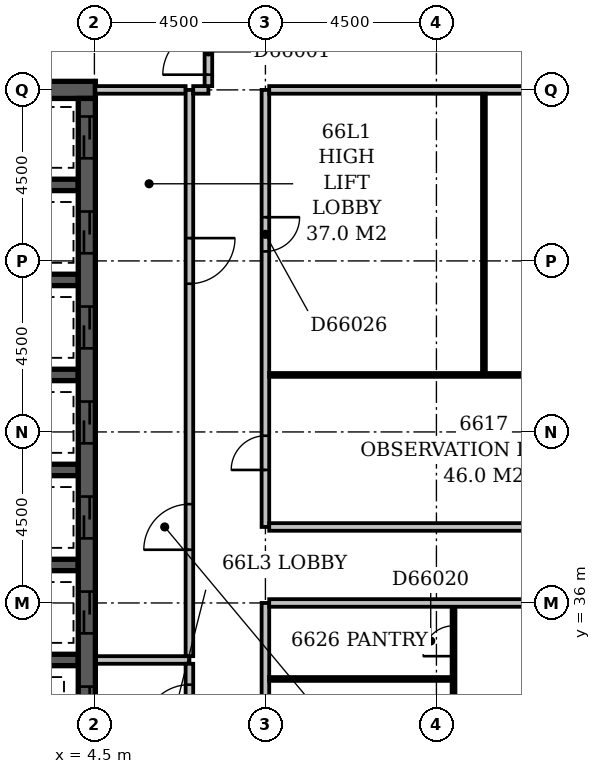
"""IFC4 building model, lengths in metres.
Left out: names, types, materials, properties, quantities, classifications, styles, units other than length and angle.
Written with IfcOpenShell. Run it as: python <this file> out.ifc"""

import sys

from ifc_helpers import new_model, si_unit, direction, frame, frame_2d, origin, place, context, subcontext, project, spatial, rectangle, extrude, element, fill, save


model = new_model("IFC4")
c1 = context("Model", 3, precision=1e-05, world=origin(), true_north=direction((0.0, 1.0)))
c2 = subcontext(c1, "Body", "Model", "MODEL_VIEW")
j1 = project(units=[si_unit("LENGTHUNIT", "METRE"), si_unit("PLANEANGLEUNIT", "RADIAN")], contexts=[c1])
p1 = place(None, origin())
s1 = spatial("IfcSite", under=j1, at=p1, CompositionType="ELEMENT")
p2 = place(p1, origin())
s2 = spatial("IfcBuilding", under=s1, at=p2, CompositionType="ELEMENT")
p3 = place(p2, frame((0.0, 0.0, 254.6)))
s3 = spatial("IfcBuildingStorey", under=s2, at=p3, CompositionType="ELEMENT", Elevation=254.6)
p4 = place(p3, frame((0.275, 49.5, -0.3), z_axis=(0.0, 0.0, 1.0), x_axis=(1.0, 0.0, 0.0)))
e1 = element("IfcWall", 1, at=p4, inside=s3, PredefinedType="SHEAR", context=c2, shape_type="SweptSolid", body=[
    extrude(rectangle(XDim=4.25, YDim=0.45, at=frame_2d((2.125, 0.0))), origin(), (0.0, 0.0, 1.0), 3.45),
])
for number, where, z_axis, x_axis in (
    (2, (0.725, 34.5, -0.3), (0.0, 0.0, 1.0), (1.0, 0.0, 0.0)),
    (3, (0.725, 37.0, -0.3), (0.0, 0.0, 1.0), (1.0, 0.0, 0.0)),
    (4, (0.725, 39.5, -0.3), (0.0, 0.0, 1.0), (1.0, 0.0, 0.0)),
    (5, (0.725, 42.0, -0.3), (0.0, 0.0, 1.0), (1.0, 0.0, 0.0)),
    (6, (0.725, 44.5, -0.3), (0.0, 0.0, 1.0), (1.0, 0.0, 0.0)),
    (7, (0.725, 47.0, -0.3), (0.0, 0.0, 1.0), (1.0, 0.0, 0.0)),
):
    element("IfcWall", number, at=place(p3, frame(where, z_axis=z_axis, x_axis=x_axis)), inside=s3, PredefinedType="SHEAR", context=c2, shape_type="SweptSolid", body=[
        extrude(rectangle(XDim=3.35, YDim=0.3, at=frame_2d((1.675, 0.0))), origin(), (0.0, 0.0, 1.0), 3.45),
    ])
p5 = place(p3, frame((4.3, 27.15, -0.3), z_axis=(0.0, 0.0, 1.0), x_axis=(0.0, 1.0, 0.0)))
e8 = element("IfcWall", 8, at=p5, inside=s3, PredefinedType="SHEAR", context=c2, shape_type="SweptSolid", body=[
    extrude(rectangle(XDim=22.125, YDim=0.45, at=frame_2d((11.062, 0.0))), origin(), (0.0, 0.0, 1.0), 3.45),
])
p6 = place(p5, frame((3.05, 0.0, 0.3)))
e9 = element("IfcOpeningElement", 9, at=p6, cuts=e8, PredefinedType="OPENING", context=c2, shape_type="SweptSolid", body=[
    extrude(rectangle(XDim=1.1, YDim=2.1, at=frame_2d((0.55, 1.05))), frame((0.0, 0.237, 0.0), z_axis=(0.0, -1.0, 0.0), x_axis=(1.0, 0.0, 0.0)), (0.0, 0.0, 1.0), 0.474),
])
p7 = place(p5, frame((0.55, 0.0, 0.3)))
e10 = element("IfcOpeningElement", 10, at=p7, cuts=e8, PredefinedType="OPENING", context=c2, shape_type="SweptSolid", body=[
    extrude(rectangle(XDim=1.1, YDim=2.1, at=frame_2d((0.55, 1.05))), frame((0.0, 0.237, 0.0), z_axis=(0.0, -1.0, 0.0), x_axis=(1.0, 0.0, 0.0)), (0.0, 0.0, 1.0), 0.474),
])
p8 = place(p5, frame((20.55, 0.0, 0.3)))
e11 = element("IfcOpeningElement", 11, at=p8, cuts=e8, PredefinedType="OPENING", context=c2, shape_type="SweptSolid", body=[
    extrude(rectangle(XDim=1.1, YDim=2.1, at=frame_2d((0.55, 1.05))), frame((0.0, 0.237, 0.0), z_axis=(0.0, -1.0, 0.0), x_axis=(1.0, 0.0, 0.0)), (0.0, 0.0, 1.0), 0.474),
])
p9 = place(p5, frame((18.05, 0.0, 0.3)))
e12 = element("IfcOpeningElement", 12, at=p9, cuts=e8, PredefinedType="OPENING", context=c2, shape_type="SweptSolid", body=[
    extrude(rectangle(XDim=1.1, YDim=2.1, at=frame_2d((0.55, 1.05))), frame((0.0, 0.237, 0.0), z_axis=(0.0, -1.0, 0.0), x_axis=(1.0, 0.0, 0.0)), (0.0, 0.0, 1.0), 0.474),
])
p10 = place(p5, frame((15.55, 0.0, 0.3)))
e13 = element("IfcOpeningElement", 13, at=p10, cuts=e8, PredefinedType="OPENING", context=c2, shape_type="SweptSolid", body=[
    extrude(rectangle(XDim=1.1, YDim=2.1, at=frame_2d((0.55, 1.05))), frame((0.0, 0.237, 0.0), z_axis=(0.0, -1.0, 0.0), x_axis=(1.0, 0.0, 0.0)), (0.0, 0.0, 1.0), 0.474),
])
p11 = place(p5, frame((13.05, 0.0, 0.3)))
e14 = element("IfcOpeningElement", 14, at=p11, cuts=e8, PredefinedType="OPENING", context=c2, shape_type="SweptSolid", body=[
    extrude(rectangle(XDim=1.1, YDim=2.1, at=frame_2d((0.55, 1.05))), frame((0.0, 0.237, 0.0), z_axis=(0.0, -1.0, 0.0), x_axis=(1.0, 0.0, 0.0)), (0.0, 0.0, 1.0), 0.474),
])
p12 = place(p5, frame((10.55, 0.0, 0.3)))
e15 = element("IfcOpeningElement", 15, at=p12, cuts=e8, PredefinedType="OPENING", context=c2, shape_type="SweptSolid", body=[
    extrude(rectangle(XDim=1.1, YDim=2.1, at=frame_2d((0.55, 1.05))), frame((0.0, 0.237, 0.0), z_axis=(0.0, -1.0, 0.0), x_axis=(1.0, 0.0, 0.0)), (0.0, 0.0, 1.0), 0.474),
])
p13 = place(p5, frame((8.05, 0.0, 0.3)))
e16 = element("IfcOpeningElement", 16, at=p13, cuts=e8, PredefinedType="OPENING", context=c2, shape_type="SweptSolid", body=[
    extrude(rectangle(XDim=1.1, YDim=2.1, at=frame_2d((0.55, 1.05))), frame((0.0, 0.237, 0.0), z_axis=(0.0, -1.0, 0.0), x_axis=(1.0, 0.0, 0.0)), (0.0, 0.0, 1.0), 0.474),
])
p14 = place(p5, frame((5.55, 0.0, 0.3)))
e17 = element("IfcOpeningElement", 17, at=p14, cuts=e8, PredefinedType="OPENING", context=c2, shape_type="SweptSolid", body=[
    extrude(rectangle(XDim=1.1, YDim=2.1, at=frame_2d((0.55, 1.05))), frame((0.0, 0.237, 0.0), z_axis=(0.0, -1.0, 0.0), x_axis=(1.0, 0.0, 0.0)), (0.0, 0.0, 1.0), 0.474),
])
p15 = place(p3, frame((4.545, 34.5, 0.0), z_axis=(0.0, 0.0, 1.0), x_axis=(1.0, 0.0, 0.0)))
e18 = element("IfcWall", 18, at=p15, inside=s3, PredefinedType="PARTITIONING", context=c2, shape_type="SweptSolid", body=[
    extrude(rectangle(XDim=2.455, YDim=0.2, at=frame_2d((1.228, 0.0))), origin(), (0.0, 0.0, 1.0), 3.15),
])
p16 = place(p3, frame((7.0, 34.6, 0.0), z_axis=(0.0, 0.0, 1.0), x_axis=(0.0, 1.0, 0.0)))
e19 = element("IfcWall", 19, at=p16, inside=s3, PredefinedType="PARTITIONING", context=c2, shape_type="SweptSolid", body=[
    extrude(rectangle(XDim=14.9, YDim=0.2, at=frame_2d((7.45, 0.0))), origin(), (0.0, 0.0, 1.0), 3.15),
])
p17 = place(p16, frame((2.8, 0.0, 0.0)))
e20 = element("IfcOpeningElement", 20, at=p17, cuts=e19, PredefinedType="OPENING", context=c2, shape_type="SweptSolid", body=[
    extrude(rectangle(XDim=1.2, YDim=2.1, at=frame_2d((0.6, 1.05))), frame((0.0, 0.112, 0.0), z_axis=(0.0, -1.0, 0.0), x_axis=(1.0, 0.0, 0.0)), (0.0, 0.0, 1.0), 0.224),
])
p18 = place(p16, frame((9.8, 0.0, 0.0)))
e21 = element("IfcOpeningElement", 21, at=p18, cuts=e19, PredefinedType="OPENING", context=c2, shape_type="SweptSolid", body=[
    extrude(rectangle(XDim=1.2, YDim=2.1, at=frame_2d((0.6, 1.05))), frame((0.0, 0.112, 0.0), z_axis=(0.0, -1.0, 0.0), x_axis=(1.0, 0.0, 0.0)), (0.0, 0.0, 1.0), 0.224),
])
p19 = place(p3, frame((4.525, 49.5, 0.0), z_axis=(0.0, 0.0, 1.0), x_axis=(1.0, 0.0, 0.0)))
e22 = element("IfcWall", 22, at=p19, inside=s3, PredefinedType="PARTITIONING", context=c2, shape_type="SweptSolid", body=[
    extrude(rectangle(XDim=2.375, YDim=0.2, at=frame_2d((1.188, 0.0))), origin(), (0.0, 0.0, 1.0), 3.15),
])
p20 = place(p3, frame((7.0, 32.1, 0.0), z_axis=(0.0, 0.0, 1.0), x_axis=(0.0, 1.0, 0.0)))
e23 = element("IfcWall", 23, at=p20, inside=s3, PredefinedType="PARTITIONING", context=c2, shape_type="SweptSolid", body=[
    extrude(rectangle(XDim=2.3, YDim=0.2, at=frame_2d((1.15, 0.0))), origin(), (0.0, 0.0, 1.0), 3.15),
])
p21 = place(p20, frame((0.55, 0.0, 0.0)))
e24 = element("IfcOpeningElement", 24, at=p21, cuts=e23, PredefinedType="OPENING", context=c2, shape_type="SweptSolid", body=[
    extrude(rectangle(XDim=1.2, YDim=2.1, at=frame_2d((0.6, 1.05))), frame((0.0, 0.112, 0.0), z_axis=(0.0, -1.0, 0.0), x_axis=(1.0, 0.0, 0.0)), (0.0, 0.0, 1.0), 0.224),
])
p22 = place(p3, frame((7.1, 49.5, 0.0), z_axis=(0.0, 0.0, 1.0), x_axis=(1.0, 0.0, 0.0)))
e25 = element("IfcWall", 25, at=p22, inside=s3, PredefinedType="PARTITIONING", context=c2, shape_type="SweptSolid", body=[
    extrude(rectangle(XDim=0.4, YDim=0.2, at=frame_2d((0.2, 0.0))), origin(), (0.0, 0.0, 1.0), 3.15),
])
p23 = place(p3, frame((7.5, 49.6, 0.0), z_axis=(0.0, 0.0, 1.0), x_axis=(0.0, 1.0, 0.0)))
e26 = element("IfcWall", 26, at=p23, inside=s3, PredefinedType="PARTITIONING", context=c2, shape_type="SweptSolid", body=[
    extrude(rectangle(XDim=3.9, YDim=0.2, at=frame_2d((1.95, 0.0))), origin(), (0.0, 0.0, 1.0), 3.15),
])
p24 = place(p23, frame((0.3, 0.0, 0.0)))
e27 = element("IfcOpeningElement", 27, at=p24, cuts=e26, PredefinedType="OPENING", context=c2, shape_type="SweptSolid", body=[
    extrude(rectangle(XDim=1.2, YDim=2.1, at=frame_2d((0.6, 1.05))), frame((0.0, 0.112, 0.0), z_axis=(0.0, -1.0, 0.0), x_axis=(1.0, 0.0, 0.0)), (0.0, 0.0, 1.0), 0.224),
])
p25 = place(p3, frame((9.0, 18.45, 0.0), z_axis=(0.0, 0.0, 1.0), x_axis=(0.0, 1.0, 0.0)))
e28 = element("IfcWall", 28, at=p25, inside=s3, PredefinedType="PARTITIONING", context=c2, shape_type="SweptSolid", body=[
    extrude(rectangle(XDim=17.55, YDim=0.2, at=frame_2d((8.775, 0.0))), origin(), (0.0, 0.0, 1.0), 3.15),
])
p26 = place(p25, frame((6.75, 0.0, 0.0)))
e29 = element("IfcOpeningElement", 29, at=p26, cuts=e28, PredefinedType="OPENING", context=c2, shape_type="SweptSolid", body=[
    extrude(rectangle(XDim=1.0, YDim=2.1, at=frame_2d((0.5, 1.05))), frame((0.0, 0.112, 0.0), z_axis=(0.0, -1.0, 0.0), x_axis=(1.0, 0.0, 0.0)), (0.0, 0.0, 1.0), 0.224),
])
p27 = place(p3, frame((13.95, 26.5, 0.0), z_axis=(0.0, 0.0, 1.0), x_axis=(0.0, 1.0, 0.0)))
e30 = element("IfcWall", 30, at=p27, inside=s3, PredefinedType="PARTITIONING", context=c2, shape_type="SweptSolid", body=[
    extrude(rectangle(XDim=9.4, YDim=0.1, at=frame_2d((4.7, 0.0))), origin(), (0.0, 0.0, 1.0), 3.15),
])
p28 = place(p27, frame((0.8, 0.0, 0.0)))
e31 = element("IfcOpeningElement", 31, at=p28, cuts=e30, PredefinedType="OPENING", context=c2, shape_type="SweptSolid", body=[
    extrude(rectangle(XDim=0.8, YDim=2.1, at=frame_2d((0.4, 1.05))), frame((0.0, 0.062, 0.0), z_axis=(0.0, -1.0, 0.0), x_axis=(1.0, 0.0, 0.0)), (0.0, 0.0, 1.0), 0.124),
])
p29 = place(p27, frame((8.1, 0.0, 0.0)))
e32 = element("IfcOpeningElement", 32, at=p29, cuts=e30, PredefinedType="OPENING", context=c2, shape_type="SweptSolid", body=[
    extrude(rectangle(XDim=0.8, YDim=2.1, at=frame_2d((0.4, 1.05))), frame((0.0, 0.062, 0.0), z_axis=(0.0, -1.0, 0.0), x_axis=(1.0, 0.0, 0.0)), (0.0, 0.0, 1.0), 0.124),
])
p30 = place(p27, frame((4.3, 0.0, 0.0)))
e33 = element("IfcOpeningElement", 33, at=p30, cuts=e30, PredefinedType="OPENING", context=c2, shape_type="SweptSolid", body=[
    extrude(rectangle(XDim=0.8, YDim=2.1, at=frame_2d((0.4, 1.05))), frame((0.0, 0.062, 0.0), z_axis=(0.0, -1.0, 0.0), x_axis=(1.0, 0.0, 0.0)), (0.0, 0.0, 1.0), 0.124),
])
p31 = place(p27, frame((6.1, 0.0, 0.0)))
e34 = element("IfcOpeningElement", 34, at=p31, cuts=e30, PredefinedType="OPENING", context=c2, shape_type="SweptSolid", body=[
    extrude(rectangle(XDim=0.8, YDim=2.1, at=frame_2d((0.4, 1.05))), frame((0.0, 0.062, 0.0), z_axis=(0.0, -1.0, 0.0), x_axis=(1.0, 0.0, 0.0)), (0.0, 0.0, 1.0), 0.124),
])
p32 = place(p27, frame((2.75, 0.0, 0.0)))
e35 = element("IfcOpeningElement", 35, at=p32, cuts=e30, PredefinedType="OPENING", context=c2, shape_type="SweptSolid", body=[
    extrude(rectangle(XDim=0.8, YDim=2.1, at=frame_2d((0.4, 1.05))), frame((0.0, 0.062, 0.0), z_axis=(0.0, -1.0, 0.0), x_axis=(1.0, 0.0, 0.0)), (0.0, 0.0, 1.0), 0.124),
])
p33 = place(p3, frame((9.1, 34.0, 0.0), z_axis=(0.0, 0.0, 1.0), x_axis=(1.0, 0.0, 0.0)))
e36 = element("IfcWall", 36, at=p33, inside=s3, PredefinedType="PARTITIONING", context=c2, shape_type="SweptSolid", body=[
    extrude(rectangle(XDim=4.8, YDim=0.1, at=frame_2d((2.4, 0.0))), origin(), (0.0, 0.0, 1.0), 3.15),
])
p34 = place(p3, frame((9.1, 36.0, 0.0), z_axis=(0.0, 0.0, 1.0), x_axis=(1.0, 0.0, 0.0)))
e37 = element("IfcWall", 37, at=p34, inside=s3, PredefinedType="PARTITIONING", context=c2, shape_type="SweptSolid", body=[
    extrude(rectangle(XDim=12.95, YDim=0.2, at=frame_2d((6.475, 0.0))), origin(), (0.0, 0.0, 1.0), 3.15),
])
p35 = place(p3, frame((9.0, 38.0, 0.0), z_axis=(0.0, 0.0, 1.0), x_axis=(0.0, 1.0, 0.0)))
e38 = element("IfcWall", 38, at=p35, inside=s3, PredefinedType="PARTITIONING", context=c2, shape_type="SweptSolid", body=[
    extrude(rectangle(XDim=11.5, YDim=0.2, at=frame_2d((5.75, 0.0))), origin(), (0.0, 0.0, 1.0), 3.15),
])
p36 = place(p35, frame((1.5, 0.0, 0.0)))
e39 = element("IfcOpeningElement", 39, at=p36, cuts=e38, PredefinedType="OPENING", context=c2, shape_type="SweptSolid", body=[
    extrude(rectangle(XDim=0.9, YDim=2.1, at=frame_2d((0.45, 1.05))), frame((0.0, 0.112, 0.0), z_axis=(0.0, -1.0, 0.0), x_axis=(1.0, 0.0, 0.0)), (0.0, 0.0, 1.0), 0.224),
])
p37 = place(p35, frame((7.25, 0.0, 0.0)))
e40 = element("IfcOpeningElement", 40, at=p37, cuts=e38, PredefinedType="OPENING", context=c2, shape_type="SweptSolid", body=[
    extrude(rectangle(XDim=0.9, YDim=2.1, at=frame_2d((0.45, 1.05))), frame((0.0, 0.112, 0.0), z_axis=(0.0, -1.0, 0.0), x_axis=(1.0, 0.0, 0.0)), (0.0, 0.0, 1.0), 0.224),
])
p38 = place(p3, frame((9.1, 38.0, 0.0), z_axis=(0.0, 0.0, 1.0), x_axis=(1.0, 0.0, 0.0)))
e41 = element("IfcWall", 41, at=p38, inside=s3, PredefinedType="PARTITIONING", context=c2, shape_type="SweptSolid", body=[
    extrude(rectangle(XDim=11.3, YDim=0.2, at=frame_2d((5.65, 0.0))), origin(), (0.0, 0.0, 1.0), 3.15),
])
p39 = place(p3, frame((9.1, 42.0, 0.0), z_axis=(0.0, 0.0, 1.0), x_axis=(1.0, 0.0, 0.0)))
e42 = element("IfcWall", 42, at=p39, inside=s3, PredefinedType="PARTITIONING", context=c2, shape_type="SweptSolid", body=[
    extrude(rectangle(XDim=11.3, YDim=0.1, at=frame_2d((5.65, 0.0))), origin(), (0.0, 0.0, 1.0), 3.15),
])
p40 = place(p3, frame((14.75, 42.05, 0.0), z_axis=(0.0, 0.0, 1.0), x_axis=(0.0, 1.0, 0.0)))
e43 = element("IfcWall", 43, at=p40, inside=s3, PredefinedType="PARTITIONING", context=c2, shape_type="SweptSolid", body=[
    extrude(rectangle(XDim=7.35, YDim=0.1, at=frame_2d((3.675, 0.0))), origin(), (0.0, 0.0, 1.0), 3.15),
])
p41 = place(p3, frame((9.1, 49.5, 0.0), z_axis=(0.0, 0.0, 1.0), x_axis=(1.0, 0.0, 0.0)))
e44 = element("IfcWall", 44, at=p41, inside=s3, PredefinedType="PARTITIONING", context=c2, shape_type="SweptSolid", body=[
    extrude(rectangle(XDim=11.3, YDim=0.2, at=frame_2d((5.65, 0.0))), origin(), (0.0, 0.0, 1.0), 3.15),
])
p42 = place(p41, frame((8.025, 0.0, 0.0)))
e45 = element("IfcOpeningElement", 45, at=p42, cuts=e44, PredefinedType="OPENING", context=c2, shape_type="SweptSolid", body=[
    extrude(rectangle(XDim=0.9, YDim=2.1, at=frame_2d((0.45, 1.05))), frame((0.0, 0.112, 0.0), z_axis=(0.0, -1.0, 0.0), x_axis=(1.0, 0.0, 0.0)), (0.0, 0.0, 1.0), 0.224),
])
p43 = place(p24, origin())
e46 = element("IfcDoor", 46, at=p43, inside=s3, OperationType="SINGLE_SWING_LEFT", PredefinedType="DOOR", context=c2, shape_type="SweptSolid", body=[
    extrude(rectangle(XDim=1.2, YDim=2.1, at=frame_2d((0.6, 1.05))), frame((0.0, 0.025, 0.0), z_axis=(0.0, -1.0, 0.0), x_axis=(1.0, 0.0, 0.0)), (0.0, 0.0, 1.0), 0.05),
])
fill(e27, e46)
p44 = place(p8, origin())
e47 = element("IfcDoor", 47, at=p44, inside=s3, OperationType="SLIDING_TO_LEFT", PredefinedType="DOOR", context=c2, shape_type="SweptSolid", body=[
    extrude(rectangle(XDim=1.1, YDim=2.1, at=frame_2d((0.55, 1.05))), frame((0.0, 0.025, 0.0), z_axis=(0.0, -1.0, 0.0), x_axis=(1.0, 0.0, 0.0)), (0.0, 0.0, 1.0), 0.05),
])
fill(e11, e47)
p45 = place(p9, origin())
e48 = element("IfcDoor", 48, at=p45, inside=s3, OperationType="SLIDING_TO_LEFT", PredefinedType="DOOR", context=c2, shape_type="SweptSolid", body=[
    extrude(rectangle(XDim=1.1, YDim=2.1, at=frame_2d((0.55, 1.05))), frame((0.0, 0.025, 0.0), z_axis=(0.0, -1.0, 0.0), x_axis=(1.0, 0.0, 0.0)), (0.0, 0.0, 1.0), 0.05),
])
fill(e12, e48)
p46 = place(p10, origin())
e49 = element("IfcDoor", 49, at=p46, inside=s3, OperationType="SLIDING_TO_LEFT", PredefinedType="DOOR", context=c2, shape_type="SweptSolid", body=[
    extrude(rectangle(XDim=1.1, YDim=2.1, at=frame_2d((0.55, 1.05))), frame((0.0, 0.025, 0.0), z_axis=(0.0, -1.0, 0.0), x_axis=(1.0, 0.0, 0.0)), (0.0, 0.0, 1.0), 0.05),
])
fill(e13, e49)
p47 = place(p11, origin())
e50 = element("IfcDoor", 50, at=p47, inside=s3, OperationType="SLIDING_TO_LEFT", PredefinedType="DOOR", context=c2, shape_type="SweptSolid", body=[
    extrude(rectangle(XDim=1.1, YDim=2.1, at=frame_2d((0.55, 1.05))), frame((0.0, 0.025, 0.0), z_axis=(0.0, -1.0, 0.0), x_axis=(1.0, 0.0, 0.0)), (0.0, 0.0, 1.0), 0.05),
])
fill(e14, e50)
p48 = place(p12, origin())
e51 = element("IfcDoor", 51, at=p48, inside=s3, OperationType="SLIDING_TO_LEFT", PredefinedType="DOOR", context=c2, shape_type="SweptSolid", body=[
    extrude(rectangle(XDim=1.1, YDim=2.1, at=frame_2d((0.55, 1.05))), frame((0.0, 0.025, 0.0), z_axis=(0.0, -1.0, 0.0), x_axis=(1.0, 0.0, 0.0)), (0.0, 0.0, 1.0), 0.05),
])
fill(e15, e51)
p49 = place(p13, origin())
e52 = element("IfcDoor", 52, at=p49, inside=s3, OperationType="SLIDING_TO_LEFT", PredefinedType="DOOR", context=c2, shape_type="SweptSolid", body=[
    extrude(rectangle(XDim=1.1, YDim=2.1, at=frame_2d((0.55, 1.05))), frame((0.0, 0.025, 0.0), z_axis=(0.0, -1.0, 0.0), x_axis=(1.0, 0.0, 0.0)), (0.0, 0.0, 1.0), 0.05),
])
fill(e16, e52)
p50 = place(p17, origin())
e53 = element("IfcDoor", 53, at=p50, inside=s3, OperationType="SINGLE_SWING_LEFT", PredefinedType="DOOR", context=c2, shape_type="SweptSolid", body=[
    extrude(rectangle(XDim=1.2, YDim=2.1, at=frame_2d((0.6, 1.05))), frame((0.0, 0.025, 0.0), z_axis=(0.0, -1.0, 0.0), x_axis=(1.0, 0.0, 0.0)), (0.0, 0.0, 1.0), 0.05),
])
fill(e20, e53)
p51 = place(p18, origin())
e54 = element("IfcDoor", 54, at=p51, inside=s3, OperationType="SINGLE_SWING_RIGHT", PredefinedType="DOOR", context=c2, shape_type="SweptSolid", body=[
    extrude(rectangle(XDim=1.2, YDim=2.1, at=frame_2d((0.6, 1.05))), frame((0.0, 0.025, 0.0), z_axis=(0.0, -1.0, 0.0), x_axis=(1.0, 0.0, 0.0)), (0.0, 0.0, 1.0), 0.05),
])
fill(e21, e54)
p52 = place(p21, origin())
e55 = element("IfcDoor", 55, at=p52, inside=s3, OperationType="SINGLE_SWING_LEFT", PredefinedType="DOOR", context=c2, shape_type="SweptSolid", body=[
    extrude(rectangle(XDim=1.2, YDim=2.1, at=frame_2d((0.6, 1.05))), frame((0.0, 0.025, 0.0), z_axis=(0.0, -1.0, 0.0), x_axis=(1.0, 0.0, 0.0)), (0.0, 0.0, 1.0), 0.05),
])
fill(e24, e55)
p53 = place(p14, origin())
e56 = element("IfcDoor", 56, at=p53, inside=s3, OperationType="SLIDING_TO_LEFT", PredefinedType="DOOR", context=c2, shape_type="SweptSolid", body=[
    extrude(rectangle(XDim=1.1, YDim=2.1, at=frame_2d((0.55, 1.05))), frame((0.0, 0.025, 0.0), z_axis=(0.0, -1.0, 0.0), x_axis=(1.0, 0.0, 0.0)), (0.0, 0.0, 1.0), 0.05),
])
fill(e17, e56)
p54 = place(p29, origin())
e57 = element("IfcDoor", 57, at=p54, inside=s3, OperationType="SINGLE_SWING_LEFT", PredefinedType="DOOR", context=c2, shape_type="SweptSolid", body=[
    extrude(rectangle(XDim=0.8, YDim=2.1, at=frame_2d((0.4, 1.05))), frame((0.0, 0.025, 0.0), z_axis=(0.0, -1.0, 0.0), x_axis=(1.0, 0.0, 0.0)), (0.0, 0.0, 1.0), 0.05),
])
fill(e32, e57)
p55 = place(p36, origin())
e58 = element("IfcDoor", 58, at=p55, inside=s3, OperationType="SINGLE_SWING_LEFT", PredefinedType="DOOR", context=c2, shape_type="SweptSolid", body=[
    extrude(rectangle(XDim=0.9, YDim=2.1, at=frame_2d((0.45, 1.05))), frame((0.0, 0.025, 0.0), z_axis=(0.0, -1.0, 0.0), x_axis=(1.0, 0.0, 0.0)), (0.0, 0.0, 1.0), 0.05),
])
fill(e39, e58)
p56 = place(p37, origin())
e59 = element("IfcDoor", 59, at=p56, inside=s3, OperationType="SINGLE_SWING_RIGHT", PredefinedType="DOOR", context=c2, shape_type="SweptSolid", body=[
    extrude(rectangle(XDim=0.9, YDim=2.1, at=frame_2d((0.45, 1.05))), frame((0.0, 0.025, 0.0), z_axis=(0.0, -1.0, 0.0), x_axis=(1.0, 0.0, 0.0)), (0.0, 0.0, 1.0), 0.05),
])
fill(e40, e59)
save(model, sys.argv[1])
